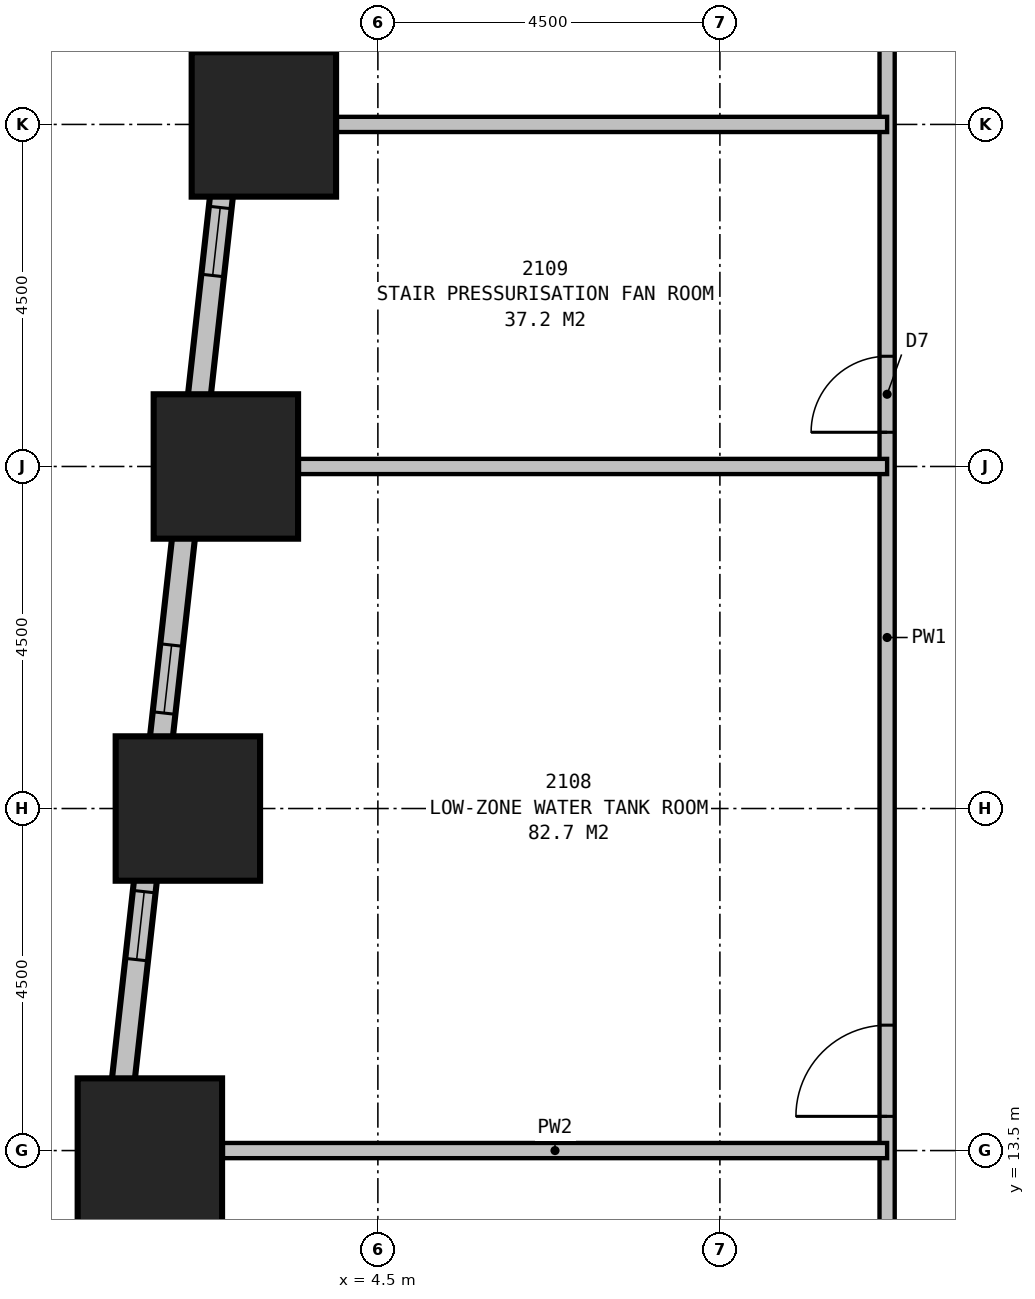
"""IFC4 building model, lengths in metres.
Left out: names, types, materials, properties, quantities, classifications, styles, units other than length and angle.
Written with IfcOpenShell. Run it as: python <this file> out.ifc"""

import sys

from ifc_helpers import new_model, si_unit, direction, frame, frame_2d, origin, origin_2d, place, context, subcontext, project, spatial, rectangle, extrude, element, fill, save


model = new_model("IFC4")
c1 = context("Model", 3, precision=1e-05, world=origin(), true_north=direction((0.0, 1.0)))
c2 = subcontext(c1, "Body", "Model", "MODEL_VIEW")
j1 = project(units=[si_unit("LENGTHUNIT", "METRE"), si_unit("PLANEANGLEUNIT", "RADIAN")], contexts=[c1])
p1 = place(None, origin())
s1 = spatial("IfcSite", under=j1, at=p1, CompositionType="ELEMENT")
p2 = place(p1, origin())
s2 = spatial("IfcBuilding", under=s1, at=p2, CompositionType="ELEMENT")
p3 = place(p2, frame((0.0, 0.0, 85.7)))
s3 = spatial("IfcBuildingStorey", under=s2, at=p3, CompositionType="ELEMENT", Elevation=85.7)
for number, where, z_axis, x_axis in (
    (1, (3.0, 27.0, 0.0), (0.0, 0.0, 1.0), (1.0, 0.0, 0.0)),
    (2, (2.5, 22.5, 0.0), (0.0, 0.0, 1.0), (1.0, 0.0, 0.0)),
    (3, (2.0, 18.0, 0.0), (0.0, 0.0, 1.0), (1.0, 0.0, 0.0)),
    (4, (1.5, 13.5, 0.0), (0.0, 0.0, 1.0), (1.0, 0.0, 0.0)),
):
    element("IfcColumn", number, at=place(p3, frame(where, z_axis=z_axis, x_axis=x_axis)), inside=s3, PredefinedType="COLUMN", context=c2, shape_type="SweptSolid", body=[
        extrude(rectangle(XDim=1.9, YDim=1.9, at=origin_2d()), origin(), (0.0, 0.0, 1.0), 4.2),
    ])
p4 = place(p3, frame((3.614, 36.599, 0.0), z_axis=(0.0, 0.0, 1.0), x_axis=(-0.110429082637, -0.993884006164, 0.0)))
e5 = element("IfcWall", 5, at=p4, inside=s3, PredefinedType="STANDARD", context=c2, shape_type="SweptSolid", body=[
    extrude(rectangle(XDim=32.899, YDim=0.3, at=frame_2d((16.45, 0.0))), origin(), (0.0, 0.0, 1.0), 2.85),
])
p5 = place(p4, frame((1.703, 0.0, 0.5)))
e6 = element("IfcOpeningElement", 6, at=p5, cuts=e5, PredefinedType="OPENING", context=c2, shape_type="SweptSolid", body=[
    extrude(rectangle(XDim=0.9, YDim=1.2, at=frame_2d((0.45, 0.6))), frame((0.0, 0.16, 0.0), z_axis=(0.0, -1.0, 0.0), x_axis=(1.0, 0.0, 0.0)), (0.0, 0.0, 1.0), 0.32),
])
p6 = place(p4, frame((7.495, 0.0, 0.5)))
e7 = element("IfcOpeningElement", 7, at=p6, cuts=e5, PredefinedType="OPENING", context=c2, shape_type="SweptSolid", body=[
    extrude(rectangle(XDim=0.9, YDim=1.2, at=frame_2d((0.45, 0.6))), frame((0.0, 0.16, 0.0), z_axis=(0.0, -1.0, 0.0), x_axis=(1.0, 0.0, 0.0)), (0.0, 0.0, 1.0), 0.32),
])
p7 = place(p4, frame((10.758, 0.0, 0.5)))
e8 = element("IfcOpeningElement", 8, at=p7, cuts=e5, PredefinedType="OPENING", context=c2, shape_type="SweptSolid", body=[
    extrude(rectangle(XDim=0.9, YDim=1.2, at=frame_2d((0.45, 0.6))), frame((0.0, 0.16, 0.0), z_axis=(0.0, -1.0, 0.0), x_axis=(1.0, 0.0, 0.0)), (0.0, 0.0, 1.0), 0.32),
])
p8 = place(p4, frame((16.55, 0.0, 0.5)))
e9 = element("IfcOpeningElement", 9, at=p8, cuts=e5, PredefinedType="OPENING", context=c2, shape_type="SweptSolid", body=[
    extrude(rectangle(XDim=0.9, YDim=1.2, at=frame_2d((0.45, 0.6))), frame((0.0, 0.16, 0.0), z_axis=(0.0, -1.0, 0.0), x_axis=(1.0, 0.0, 0.0)), (0.0, 0.0, 1.0), 0.32),
])
p9 = place(p4, frame((19.814, 0.0, 0.5)))
e10 = element("IfcOpeningElement", 10, at=p9, cuts=e5, PredefinedType="OPENING", context=c2, shape_type="SweptSolid", body=[
    extrude(rectangle(XDim=0.9, YDim=1.2, at=frame_2d((0.45, 0.6))), frame((0.0, 0.16, 0.0), z_axis=(0.0, -1.0, 0.0), x_axis=(1.0, 0.0, 0.0)), (0.0, 0.0, 1.0), 0.32),
])
p10 = place(p4, frame((25.605, 0.0, 0.5)))
e11 = element("IfcOpeningElement", 11, at=p10, cuts=e5, PredefinedType="OPENING", context=c2, shape_type="SweptSolid", body=[
    extrude(rectangle(XDim=0.9, YDim=1.2, at=frame_2d((0.45, 0.6))), frame((0.0, 0.16, 0.0), z_axis=(0.0, -1.0, 0.0), x_axis=(1.0, 0.0, 0.0)), (0.0, 0.0, 1.0), 0.32),
])
p11 = place(p4, frame((28.869, 0.0, 0.5)))
e12 = element("IfcOpeningElement", 12, at=p11, cuts=e5, PredefinedType="OPENING", context=c2, shape_type="SweptSolid", body=[
    extrude(rectangle(XDim=0.9, YDim=1.2, at=frame_2d((0.45, 0.6))), frame((0.0, 0.16, 0.0), z_axis=(0.0, -1.0, 0.0), x_axis=(1.0, 0.0, 0.0)), (0.0, 0.0, 1.0), 0.32),
])
p12 = place(p3, frame((11.2, 11.2, 0.0), z_axis=(0.0, 0.0, 1.0), x_axis=(0.0, 1.0, 0.0)))
e13 = element("IfcWall", 13, at=p12, inside=s3, PredefinedType="PARTITIONING", context=c2, shape_type="SweptSolid", body=[
    extrude(rectangle(XDim=18.1, YDim=0.2, at=frame_2d((9.05, 0.0))), origin(), (0.0, 0.0, 1.0), 3.95),
])
p13 = place(p12, frame((2.75, 0.0, 0.0)))
e14 = element("IfcOpeningElement", 14, at=p13, cuts=e13, PredefinedType="OPENING", context=c2, shape_type="SweptSolid", body=[
    extrude(rectangle(XDim=1.2, YDim=2.1, at=frame_2d((0.6, 1.05))), frame((0.0, 0.11, 0.0), z_axis=(0.0, -1.0, 0.0), x_axis=(1.0, 0.0, 0.0)), (0.0, 0.0, 1.0), 0.22),
])
p14 = place(p12, frame((11.75, 0.0, 0.0)))
e15 = element("IfcOpeningElement", 15, at=p14, cuts=e13, PredefinedType="OPENING", context=c2, shape_type="SweptSolid", body=[
    extrude(rectangle(XDim=1.0, YDim=2.1, at=frame_2d((0.5, 1.05))), frame((0.0, 0.11, 0.0), z_axis=(0.0, -1.0, 0.0), x_axis=(1.0, 0.0, 0.0)), (0.0, 0.0, 1.0), 0.22),
])
p15 = place(p3, frame((11.2, 13.5, 0.0), z_axis=(0.0, 0.0, 1.0), x_axis=(-1.0, 0.0, 0.0)))
e16 = element("IfcWall", 16, at=p15, inside=s3, PredefinedType="PARTITIONING", context=c2, shape_type="SweptSolid", body=[
    extrude(rectangle(XDim=8.739, YDim=0.2, at=frame_2d((4.37, 0.0))), origin(), (0.0, 0.0, 1.0), 2.65),
])
p16 = place(p3, frame((11.2, 22.5, 0.0), z_axis=(0.0, 0.0, 1.0), x_axis=(-1.0, 0.0, 0.0)))
e17 = element("IfcWall", 17, at=p16, inside=s3, PredefinedType="PARTITIONING", context=c2, shape_type="SweptSolid", body=[
    extrude(rectangle(XDim=7.739, YDim=0.2, at=frame_2d((3.87, 0.0))), origin(), (0.0, 0.0, 1.0), 2.95),
])
p17 = place(p3, frame((11.2, 27.0, 0.0), z_axis=(0.0, 0.0, 1.0), x_axis=(-1.0, 0.0, 0.0)))
e18 = element("IfcWall", 18, at=p17, inside=s3, PredefinedType="PARTITIONING", context=c2, shape_type="SweptSolid", body=[
    extrude(rectangle(XDim=7.239, YDim=0.2, at=frame_2d((3.62, 0.0))), origin(), (0.0, 0.0, 1.0), 2.65),
])
p18 = place(p7, origin())
e19 = element("IfcWindow", 19, at=p18, inside=s3, PartitioningType="SINGLE_PANEL", PredefinedType="USERDEFINED", context=c2, shape_type="SweptSolid", body=[
    extrude(rectangle(XDim=0.9, YDim=1.2, at=frame_2d((0.45, 0.6))), frame((0.0, 0.03, 0.0), z_axis=(0.0, -1.0, 0.0), x_axis=(1.0, 0.0, 0.0)), (0.0, 0.0, 1.0), 0.06),
])
fill(e8, e19)
p19 = place(p8, origin())
e20 = element("IfcWindow", 20, at=p19, inside=s3, PartitioningType="SINGLE_PANEL", PredefinedType="USERDEFINED", context=c2, shape_type="SweptSolid", body=[
    extrude(rectangle(XDim=0.9, YDim=1.2, at=frame_2d((0.45, 0.6))), frame((0.0, 0.03, 0.0), z_axis=(0.0, -1.0, 0.0), x_axis=(1.0, 0.0, 0.0)), (0.0, 0.0, 1.0), 0.06),
])
fill(e9, e20)
p20 = place(p9, origin())
e21 = element("IfcWindow", 21, at=p20, inside=s3, PartitioningType="SINGLE_PANEL", PredefinedType="USERDEFINED", context=c2, shape_type="SweptSolid", body=[
    extrude(rectangle(XDim=0.9, YDim=1.2, at=frame_2d((0.45, 0.6))), frame((0.0, 0.03, 0.0), z_axis=(0.0, -1.0, 0.0), x_axis=(1.0, 0.0, 0.0)), (0.0, 0.0, 1.0), 0.06),
])
fill(e10, e21)
p21 = place(p13, origin())
e22 = element("IfcDoor", 22, at=p21, inside=s3, OperationType="SINGLE_SWING_LEFT", PredefinedType="DOOR", context=c2, shape_type="SweptSolid", body=[
    extrude(rectangle(XDim=1.2, YDim=2.1, at=frame_2d((0.6, 1.05))), frame((0.0, 0.025, 0.0), z_axis=(0.0, -1.0, 0.0), x_axis=(1.0, 0.0, 0.0)), (0.0, 0.0, 1.0), 0.05),
])
fill(e14, e22)
p22 = place(p14, origin())
e23 = element("IfcDoor", 23, at=p22, inside=s3, OperationType="SINGLE_SWING_LEFT", PredefinedType="DOOR", context=c2, shape_type="SweptSolid", body=[
    extrude(rectangle(XDim=1.0, YDim=2.1, at=frame_2d((0.5, 1.05))), frame((0.0, 0.025, 0.0), z_axis=(0.0, -1.0, 0.0), x_axis=(1.0, 0.0, 0.0)), (0.0, 0.0, 1.0), 0.05),
])
fill(e15, e23)
save(model, sys.argv[1])
